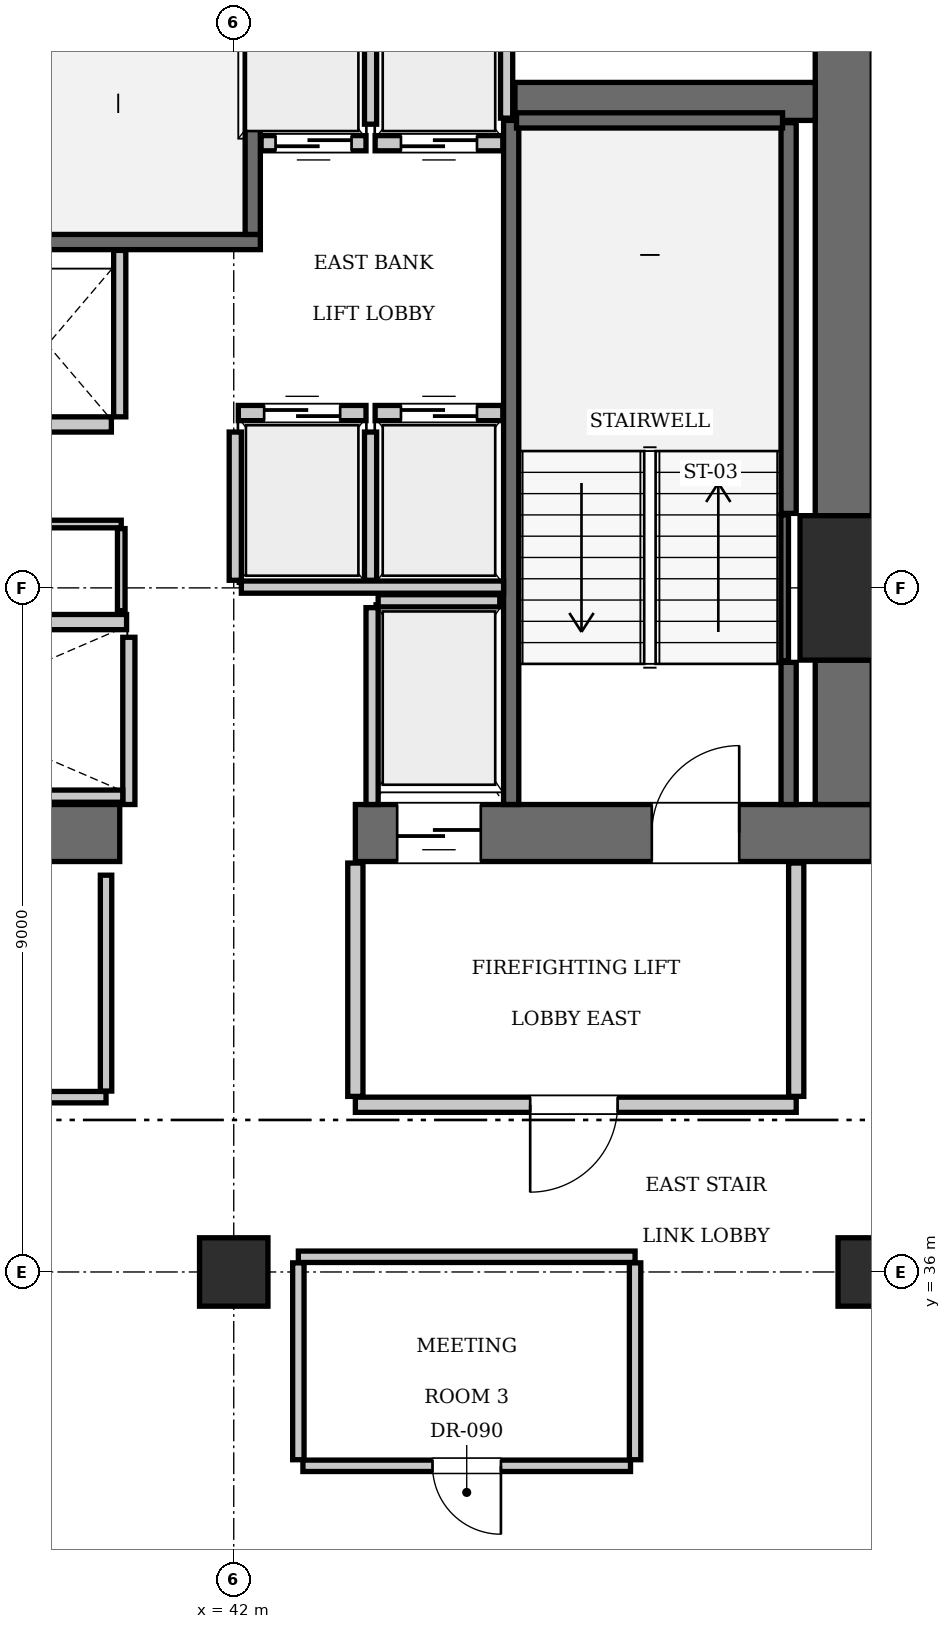
"""IFC4 building model, lengths in metres.
Left out: names, types, materials, properties, quantities, classifications, styles, units other than length and angle.
Written with IfcOpenShell. Run it as: python <this file> out.ifc"""

import sys

from ifc_helpers import new_model, si_unit, direction, frame, frame_2d, origin, origin_2d, place, context, subcontext, project, spatial, rectangle, extrude, element, fill, save


model = new_model("IFC4")
c1 = context("Model", 3, precision=1e-05, world=origin(), true_north=direction((0.0, 1.0)))
c2 = subcontext(c1, "Body", "Model", "MODEL_VIEW")
j1 = project(units=[si_unit("LENGTHUNIT", "METRE"), si_unit("PLANEANGLEUNIT", "RADIAN")], contexts=[c1])
p1 = place(None, origin())
s1 = spatial("IfcSite", under=j1, at=p1, CompositionType="ELEMENT")
p2 = place(p1, origin())
s2 = spatial("IfcBuilding", under=s1, at=p2, CompositionType="ELEMENT")
p3 = place(p2, frame((0.0, 0.0, 173.6)))
s3 = spatial("IfcBuildingStorey", under=s2, at=p3, CompositionType="ELEMENT", Elevation=173.6)
p4 = place(p3, frame((50.4, 45.0, 0.0), z_axis=(0.0, 0.0, 1.0), x_axis=(1.0, 0.0, 0.0)))
e1 = element("IfcColumn", 1, at=p4, inside=s3, PredefinedType="COLUMN", context=c2, shape_type="SweptSolid", body=[
    extrude(rectangle(XDim=1.9, YDim=1.9, at=origin_2d()), origin(), (0.0, 0.0, 1.0), 3.85),
])
p5 = place(p3, frame((35.1, 41.775, 0.0), z_axis=(0.0, 0.0, 1.0), x_axis=(1.0, 0.0, 0.0)))
e2 = element("IfcWall", 2, at=p5, inside=s3, PredefinedType="SHEAR", context=c2, shape_type="SweptSolid", body=[
    extrude(rectangle(XDim=5.4, YDim=0.75, at=frame_2d((2.7, 0.0))), origin(), (0.0, 0.0, 1.0), 3.85),
])
p6 = place(p3, frame((43.6, 41.775, 0.0), z_axis=(0.0, 0.0, 1.0), x_axis=(1.0, 0.0, 0.0)))
e3 = element("IfcWall", 3, at=p6, inside=s3, PredefinedType="SHEAR", context=c2, shape_type="SweptSolid", body=[
    extrude(rectangle(XDim=6.8, YDim=0.75, at=frame_2d((3.4, 0.0))), origin(), (0.0, 0.0, 1.0), 3.85),
])
p7 = place(p6, frame((3.9, 0.0, 0.0)))
e4 = element("IfcOpeningElement", 4, at=p7, cuts=e3, PredefinedType="OPENING", context=c2, shape_type="SweptSolid", body=[
    extrude(rectangle(XDim=1.15, YDim=2.15, at=frame_2d((0.575, 1.075))), frame((0.0, 0.385, 0.0), z_axis=(0.0, -1.0, 0.0), x_axis=(1.0, 0.0, 0.0)), (0.0, 0.0, 1.0), 0.77),
])
p8 = place(p6, frame((0.55, 0.0, 0.0)))
e5 = element("IfcOpeningElement", 5, at=p8, cuts=e3, PredefinedType="OPENING", context=c2, shape_type="SweptSolid", body=[
    extrude(rectangle(XDim=1.1, YDim=2.2, at=frame_2d((0.55, 1.1))), frame((0.0, 0.385, 0.0), z_axis=(0.0, -1.0, 0.0), x_axis=(1.0, 0.0, 0.0)), (0.0, 0.0, 1.0), 0.77),
])
p9 = place(p3, frame((50.025, 42.15, 0.0), z_axis=(0.0, 0.0, 1.0), x_axis=(0.0, 1.0, 0.0)))
e6 = element("IfcWall", 6, at=p9, inside=s3, PredefinedType="SHEAR", context=c2, shape_type="SweptSolid", body=[
    extrude(rectangle(XDim=1.9, YDim=0.75, at=frame_2d((0.95, 0.0))), origin(), (0.0, 0.0, 1.0), 3.85),
])
p10 = place(p3, frame((50.025, 45.95, 0.0), z_axis=(0.0, 0.0, 1.0), x_axis=(0.0, 1.0, 0.0)))
e7 = element("IfcWall", 7, at=p10, inside=s3, PredefinedType="SHEAR", context=c2, shape_type="SweptSolid", body=[
    extrude(rectangle(XDim=7.3, YDim=0.75, at=frame_2d((3.65, 0.0))), origin(), (0.0, 0.0, 1.0), 3.85),
])
p11 = place(p3, frame((45.7, 51.4, 0.0), z_axis=(0.0, 0.0, 1.0), x_axis=(1.0, 0.0, 0.0)))
e8 = element("IfcWall", 8, at=p11, inside=s3, PredefinedType="SHEAR", context=c2, shape_type="SweptSolid", body=[
    extrude(rectangle(XDim=3.95, YDim=0.5, at=frame_2d((1.975, 0.0))), origin(), (0.0, 0.0, 1.0), 3.85),
])
for number, where, z_axis, x_axis in (
    (9, (42.0, 36.0, 0.0), (0.0, 0.0, 1.0), (1.0, 0.0, 0.0)),
    (10, (50.4, 36.0, 0.0), (0.0, 0.0, 1.0), (1.0, 0.0, 0.0)),
):
    element("IfcColumn", number, at=place(p3, frame(where, z_axis=z_axis, x_axis=x_axis)), inside=s3, PredefinedType="COLUMN", context=c2, shape_type="SweptSolid", body=[
        extrude(rectangle(XDim=0.9, YDim=0.9, at=origin_2d()), origin(), (0.0, 0.0, 1.0), 3.85),
    ])
p12 = place(p3, frame((33.25, 49.55, 0.0), z_axis=(0.0, 0.0, 1.0), x_axis=(1.0, 0.0, 0.0)))
e11 = element("IfcWall", 11, at=p12, inside=s3, PredefinedType="SOLIDWALL", context=c2, shape_type="SweptSolid", body=[
    extrude(rectangle(XDim=9.1, YDim=0.2, at=frame_2d((4.55, 0.0))), origin(), (0.0, 0.0, 1.0), 3.61),
])
p13 = place(p3, frame((42.25, 49.65, 0.0), z_axis=(0.0, 0.0, 1.0), x_axis=(0.0, 1.0, 0.0)))
e12 = element("IfcWall", 12, at=p13, inside=s3, PredefinedType="SOLIDWALL", context=c2, shape_type="SweptSolid", body=[
    extrude(rectangle(XDim=3.6, YDim=0.2, at=frame_2d((1.8, 0.0))), origin(), (0.0, 0.0, 1.0), 3.61),
])
p14 = place(p3, frame((45.65, 42.15, 0.0), z_axis=(0.0, 0.0, 1.0), x_axis=(0.0, 1.0, 0.0)))
e13 = element("IfcWall", 13, at=p14, inside=s3, PredefinedType="SOLIDWALL", context=c2, shape_type="SweptSolid", body=[
    extrude(rectangle(XDim=9.0, YDim=0.2, at=frame_2d((4.5, 0.0))), origin(), (0.0, 0.0, 1.0), 3.61),
])
p15 = place(p3, frame((49.3, 42.15, 0.0), z_axis=(0.0, 0.0, 1.0), x_axis=(0.0, 1.0, 0.0)))
e14 = element("IfcWall", 14, at=p15, inside=s3, PredefinedType="SOLIDWALL", context=c2, shape_type="SweptSolid", body=[
    extrude(rectangle(XDim=1.87, YDim=0.2, at=frame_2d((0.935, 0.0))), origin(), (0.0, 0.0, 1.0), 3.61),
])
p16 = place(p3, frame((49.3, 45.98, 0.0), z_axis=(0.0, 0.0, 1.0), x_axis=(0.0, 1.0, 0.0)))
e15 = element("IfcWall", 15, at=p16, inside=s3, PredefinedType="SOLIDWALL", context=c2, shape_type="SweptSolid", body=[
    extrude(rectangle(XDim=5.14, YDim=0.2, at=frame_2d((2.57, 0.0))), origin(), (0.0, 0.0, 1.0), 3.61),
])
p17 = place(p3, frame((45.72, 51.15, 0.0), z_axis=(0.0, 0.0, 1.0), x_axis=(1.0, 0.0, 0.0)))
e16 = element("IfcWall", 16, at=p17, inside=s3, PredefinedType="SOLIDWALL", context=c2, shape_type="SweptSolid", body=[
    extrude(rectangle(XDim=3.5, YDim=0.2, at=frame_2d((1.75, 0.0))), origin(), (0.0, 0.0, 1.0), 3.61),
])
p18 = place(p3, frame((49.248, 44.04, 0.0), z_axis=(0.0, 0.0, 1.0), x_axis=(0.0, 1.0, 0.0)))
e17 = element("IfcWall", 17, at=p18, inside=s3, PredefinedType="SOLIDWALL", context=c2, shape_type="SweptSolid", body=[
    extrude(rectangle(XDim=1.92, YDim=0.1, at=frame_2d((0.96, 0.0))), origin(), (0.0, 0.0, 1.0), 3.61),
])
p19 = place(p3, frame((42.06, 47.3, 0.0), z_axis=(0.0, 0.0, 1.0), x_axis=(1.0, 0.0, 0.0)))
e18 = element("IfcWall", 18, at=p19, inside=s3, PredefinedType="SOLIDWALL", context=c2, shape_type="SweptSolid", body=[
    extrude(rectangle(XDim=1.68, YDim=0.2, at=frame_2d((0.84, 0.0))), origin(), (0.0, 0.0, 1.0), 3.61),
])
p20 = place(p19, frame((0.34, 0.0, 0.0)))
e19 = element("IfcOpeningElement", 19, at=p20, cuts=e18, PredefinedType="OPENING", context=c2, shape_type="SweptSolid", body=[
    extrude(rectangle(XDim=1.0, YDim=2.15, at=frame_2d((0.5, 1.075))), frame((0.0, 0.11, 0.0), z_axis=(0.0, -1.0, 0.0), x_axis=(1.0, 0.0, 0.0)), (0.0, 0.0, 1.0), 0.22),
])
p21 = place(p3, frame((43.86, 47.3, 0.0), z_axis=(0.0, 0.0, 1.0), x_axis=(1.0, 0.0, 0.0)))
e20 = element("IfcWall", 20, at=p21, inside=s3, PredefinedType="SOLIDWALL", context=c2, shape_type="SweptSolid", body=[
    extrude(rectangle(XDim=1.68, YDim=0.2, at=frame_2d((0.84, 0.0))), origin(), (0.0, 0.0, 1.0), 3.61),
])
p22 = place(p21, frame((0.34, 0.0, 0.0)))
e21 = element("IfcOpeningElement", 21, at=p22, cuts=e20, PredefinedType="OPENING", context=c2, shape_type="SweptSolid", body=[
    extrude(rectangle(XDim=1.0, YDim=2.15, at=frame_2d((0.5, 1.075))), frame((0.0, 0.11, 0.0), z_axis=(0.0, -1.0, 0.0), x_axis=(1.0, 0.0, 0.0)), (0.0, 0.0, 1.0), 0.22),
])
p23 = place(p3, frame((42.36, 50.85, 0.0), z_axis=(0.0, 0.0, 1.0), x_axis=(1.0, 0.0, 0.0)))
e22 = element("IfcWall", 22, at=p23, inside=s3, PredefinedType="SOLIDWALL", context=c2, shape_type="SweptSolid", body=[
    extrude(rectangle(XDim=1.38, YDim=0.2, at=frame_2d((0.69, 0.0))), origin(), (0.0, 0.0, 1.0), 3.61),
])
p24 = place(p23, frame((0.19, 0.0, 0.0)))
e23 = element("IfcOpeningElement", 23, at=p24, cuts=e22, PredefinedType="OPENING", context=c2, shape_type="SweptSolid", body=[
    extrude(rectangle(XDim=1.0, YDim=2.15, at=frame_2d((0.5, 1.075))), frame((0.0, 0.11, 0.0), z_axis=(0.0, -1.0, 0.0), x_axis=(1.0, 0.0, 0.0)), (0.0, 0.0, 1.0), 0.22),
])
p25 = place(p3, frame((43.86, 50.85, 0.0), z_axis=(0.0, 0.0, 1.0), x_axis=(1.0, 0.0, 0.0)))
e24 = element("IfcWall", 24, at=p25, inside=s3, PredefinedType="SOLIDWALL", context=c2, shape_type="SweptSolid", body=[
    extrude(rectangle(XDim=1.68, YDim=0.2, at=frame_2d((0.84, 0.0))), origin(), (0.0, 0.0, 1.0), 3.61),
])
p26 = place(p25, frame((0.34, 0.0, 0.0)))
e25 = element("IfcOpeningElement", 25, at=p26, cuts=e24, PredefinedType="OPENING", context=c2, shape_type="SweptSolid", body=[
    extrude(rectangle(XDim=1.0, YDim=2.15, at=frame_2d((0.5, 1.075))), frame((0.0, 0.11, 0.0), z_axis=(0.0, -1.0, 0.0), x_axis=(1.0, 0.0, 0.0)), (0.0, 0.0, 1.0), 0.22),
])
p27 = place(p3, frame((38.91, 44.55, 0.0), z_axis=(0.0, 0.0, 1.0), x_axis=(1.0, 0.0, 0.0)))
e26 = element("IfcWall", 26, at=p27, inside=s3, PredefinedType="SOLIDWALL", context=c2, shape_type="SweptSolid", body=[
    extrude(rectangle(XDim=1.68, YDim=0.2, at=frame_2d((0.84, 0.0))), origin(), (0.0, 0.0, 1.0), 3.61),
])
p28 = place(p3, frame((38.71, 47.15, 0.0), z_axis=(0.0, 0.0, 1.0), x_axis=(1.0, 0.0, 0.0)))
e27 = element("IfcWall", 27, at=p28, inside=s3, PredefinedType="SOLIDWALL", context=c2, shape_type="SweptSolid", body=[
    extrude(rectangle(XDim=1.68, YDim=0.2, at=frame_2d((0.84, 0.0))), origin(), (0.0, 0.0, 1.0), 3.61),
])
p29 = place(p3, frame((43.9, 44.83, 0.0), z_axis=(0.0, 0.0, 1.0), x_axis=(1.0, 0.0, 0.0)))
e28 = element("IfcWall", 28, at=p29, inside=s3, PredefinedType="SOLIDWALL", context=c2, shape_type="SweptSolid", body=[
    extrude(rectangle(XDim=1.6, YDim=0.16, at=frame_2d((0.8, 0.0))), origin(), (0.0, 0.0, 1.0), 3.61),
])
p30 = place(p3, frame((43.82, 42.15, 0.0), z_axis=(0.0, 0.0, 1.0), x_axis=(0.0, 1.0, 0.0)))
e29 = element("IfcWall", 29, at=p30, inside=s3, PredefinedType="SOLIDWALL", context=c2, shape_type="SweptSolid", body=[
    extrude(rectangle(XDim=2.59, YDim=0.16, at=frame_2d((1.295, 0.0))), origin(), (0.0, 0.0, 1.0), 3.61),
])
for number, where, z_axis, x_axis in (
    (30, (42.02, 45.1, 0.0), (0.0, 0.0, 1.0), (0.0, 1.0, 0.0)),
    (31, (43.8, 45.1, 0.0), (0.0, 0.0, 1.0), (0.0, 1.0, 0.0)),
):
    element("IfcWall", number, at=place(p3, frame(where, z_axis=z_axis, x_axis=x_axis)), inside=s3, PredefinedType="SOLIDWALL", context=c2, shape_type="SweptSolid", body=[
        extrude(rectangle(XDim=1.95, YDim=0.16, at=frame_2d((0.975, 0.0))), origin(), (0.0, 0.0, 1.0), 3.61),
    ])
p31 = place(p3, frame((42.1, 45.01, 0.0), z_axis=(0.0, 0.0, 1.0), x_axis=(1.0, 0.0, 0.0)))
e32 = element("IfcWall", 32, at=p31, inside=s3, PredefinedType="SOLIDWALL", context=c2, shape_type="SweptSolid", body=[
    extrude(rectangle(XDim=3.45, YDim=0.16, at=frame_2d((1.725, 0.0))), origin(), (0.0, 0.0, 1.0), 3.61),
])
p32 = place(p3, frame((45.59, 51.18, 0.0), z_axis=(0.0, 0.0, 1.0), x_axis=(0.0, 1.0, 0.0)))
e33 = element("IfcWall", 33, at=p32, inside=s3, PredefinedType="SOLIDWALL", context=c2, shape_type="SweptSolid", body=[
    extrude(rectangle(XDim=2.07, YDim=0.16, at=frame_2d((1.035, 0.0))), origin(), (0.0, 0.0, 1.0), 3.61),
])
p33 = place(p3, frame((43.8, 51.1, 0.0), z_axis=(0.0, 0.0, 1.0), x_axis=(0.0, 1.0, 0.0)))
e34 = element("IfcWall", 34, at=p33, inside=s3, PredefinedType="SOLIDWALL", context=c2, shape_type="SweptSolid", body=[
    extrude(rectangle(XDim=2.15, YDim=0.16, at=frame_2d((1.075, 0.0))), origin(), (0.0, 0.0, 1.0), 3.61),
])
p34 = place(p3, frame((40.62, 42.15, 0.0), z_axis=(0.0, 0.0, 1.0), x_axis=(0.0, 1.0, 0.0)))
e35 = element("IfcWall", 35, at=p34, inside=s3, PredefinedType="SOLIDWALL", context=c2, shape_type="SweptSolid", body=[
    extrude(rectangle(XDim=2.2, YDim=0.16, at=frame_2d((1.1, 0.0))), origin(), (0.0, 0.0, 1.0), 3.61),
])
p35 = place(p3, frame((35.52, 42.26, 0.0), z_axis=(0.0, 0.0, 1.0), x_axis=(1.0, 0.0, 0.0)))
e36 = element("IfcWall", 36, at=p35, inside=s3, PredefinedType="SOLIDWALL", context=c2, shape_type="SweptSolid", body=[
    extrude(rectangle(XDim=5.02, YDim=0.16, at=frame_2d((2.51, 0.0))), origin(), (0.0, 0.0, 1.0), 3.61),
])
p36 = place(p3, frame((40.5, 47.25, 0.0), z_axis=(0.0, 0.0, 1.0), x_axis=(0.0, 1.0, 0.0)))
e37 = element("IfcWall", 37, at=p36, inside=s3, PredefinedType="SOLIDWALL", context=c2, shape_type="SweptSolid", body=[
    extrude(rectangle(XDim=2.19, YDim=0.16, at=frame_2d((1.095, 0.0))), origin(), (0.0, 0.0, 1.0), 3.61),
])
p37 = place(p3, frame((43.6, 38.2, 0.0), z_axis=(0.0, 0.0, 1.0), x_axis=(1.0, 0.0, 0.0)))
e38 = element("IfcWall", 38, at=p37, inside=s3, PredefinedType="PARTITIONING", context=c2, shape_type="SweptSolid", body=[
    extrude(rectangle(XDim=5.8, YDim=0.2, at=frame_2d((2.9, 0.0))), origin(), (0.0, 0.0, 1.0), 3.61),
])
p38 = place(p37, frame((2.3, 0.0, 0.0)))
e39 = element("IfcOpeningElement", 39, at=p38, cuts=e38, PredefinedType="OPENING", context=c2, shape_type="SweptSolid", body=[
    extrude(rectangle(XDim=1.15, YDim=2.15, at=frame_2d((0.575, 1.075))), frame((0.0, 0.11, 0.0), z_axis=(0.0, -1.0, 0.0), x_axis=(1.0, 0.0, 0.0)), (0.0, 0.0, 1.0), 0.22),
])
for number, where, z_axis, x_axis in (
    (40, (43.6, 38.31, 0.0), (0.0, 0.0, 1.0), (0.0, 1.0, 0.0)),
    (41, (49.4, 38.31, 0.0), (0.0, 0.0, 1.0), (0.0, 1.0, 0.0)),
):
    element("IfcWall", number, at=place(p3, frame(where, z_axis=z_axis, x_axis=x_axis)), inside=s3, PredefinedType="PARTITIONING", context=c2, shape_type="SweptSolid", body=[
        extrude(rectangle(XDim=3.07, YDim=0.2, at=frame_2d((1.535, 0.0))), origin(), (0.0, 0.0, 1.0), 3.61),
    ])
p39 = place(p3, frame((35.58, 45.84, 0.0), z_axis=(0.0, 0.0, 1.0), x_axis=(1.0, 0.0, 0.0)))
e42 = element("IfcWall", 42, at=p39, inside=s3, PredefinedType="PARTITIONING", context=c2, shape_type="SweptSolid", body=[
    extrude(rectangle(XDim=4.94, YDim=0.1, at=frame_2d((2.47, 0.0))), origin(), (0.0, 0.0, 1.0), 3.61),
])
p40 = place(p39, frame((1.8, 0.0, 0.0)))
e43 = element("IfcOpeningElement", 43, at=p40, cuts=e42, PredefinedType="OPENING", context=c2, shape_type="SweptSolid", body=[
    extrude(rectangle(XDim=0.8, YDim=2.05, at=frame_2d((0.4, 1.025))), frame((0.0, 0.06, 0.0), z_axis=(0.0, -1.0, 0.0), x_axis=(1.0, 0.0, 0.0)), (0.0, 0.0, 1.0), 0.12),
])
p41 = place(p3, frame((40.52, 44.7, 0.0), z_axis=(0.0, 0.0, 1.0), x_axis=(0.0, 1.0, 0.0)))
e44 = element("IfcWall", 44, at=p41, inside=s3, PredefinedType="PARTITIONING", context=c2, shape_type="SweptSolid", body=[
    extrude(rectangle(XDim=1.08, YDim=0.1, at=frame_2d((0.54, 0.0))), origin(), (0.0, 0.0, 1.0), 3.61),
])
p42 = place(p3, frame((34.4, 38.3, 0.0), z_axis=(0.0, 0.0, 1.0), x_axis=(1.0, 0.0, 0.0)))
e45 = element("IfcWall", 45, at=p42, inside=s3, PredefinedType="PARTITIONING", context=c2, shape_type="SweptSolid", body=[
    extrude(rectangle(XDim=5.92, YDim=0.15, at=frame_2d((2.96, 0.0))), origin(), (0.0, 0.0, 1.0), 3.61),
])
p43 = place(p42, frame((2.4, 0.0, 0.0)))
e46 = element("IfcOpeningElement", 46, at=p43, cuts=e45, PredefinedType="OPENING", context=c2, shape_type="SweptSolid", body=[
    extrude(rectangle(XDim=0.9, YDim=2.1, at=frame_2d((0.45, 1.05))), frame((0.0, 0.085, 0.0), z_axis=(0.0, -1.0, 0.0), x_axis=(1.0, 0.0, 0.0)), (0.0, 0.0, 1.0), 0.17),
])
p44 = place(p3, frame((40.32, 38.38, 0.0), z_axis=(0.0, 0.0, 1.0), x_axis=(0.0, 1.0, 0.0)))
e47 = element("IfcWall", 47, at=p44, inside=s3, PredefinedType="PARTITIONING", context=c2, shape_type="SweptSolid", body=[
    extrude(rectangle(XDim=2.84, YDim=0.15, at=frame_2d((1.42, 0.0))), origin(), (0.0, 0.0, 1.0), 3.61),
])
p45 = place(p3, frame((42.85, 36.2, 0.0), z_axis=(0.0, 0.0, 1.0), x_axis=(1.0, 0.0, 0.0)))
e48 = element("IfcWall", 48, at=p45, inside=s3, PredefinedType="PARTITIONING", context=c2, shape_type="SweptSolid", body=[
    extrude(rectangle(XDim=4.43, YDim=0.15, at=frame_2d((2.215, 0.0))), origin(), (0.0, 0.0, 1.0), 3.61),
])
for number, where, z_axis, x_axis in (
    (49, (42.85, 33.53, 0.0), (0.0, 0.0, 1.0), (0.0, 1.0, 0.0)),
    (50, (47.28, 33.53, 0.0), (0.0, 0.0, 1.0), (0.0, 1.0, 0.0)),
):
    element("IfcWall", number, at=place(p3, frame(where, z_axis=z_axis, x_axis=x_axis)), inside=s3, PredefinedType="PARTITIONING", context=c2, shape_type="SweptSolid", body=[
        extrude(rectangle(XDim=2.59, YDim=0.15, at=frame_2d((1.295, 0.0))), origin(), (0.0, 0.0, 1.0), 3.61),
    ])
p46 = place(p3, frame((42.91, 33.45, 0.0), z_axis=(0.0, 0.0, 1.0), x_axis=(1.0, 0.0, 0.0)))
e51 = element("IfcWall", 51, at=p46, inside=s3, PredefinedType="PARTITIONING", context=c2, shape_type="SweptSolid", body=[
    extrude(rectangle(XDim=4.31, YDim=0.15, at=frame_2d((2.155, 0.0))), origin(), (0.0, 0.0, 1.0), 3.61),
])
p47 = place(p46, frame((1.705, 0.0, 0.0)))
e52 = element("IfcOpeningElement", 52, at=p47, cuts=e51, PredefinedType="OPENING", context=c2, shape_type="SweptSolid", body=[
    extrude(rectangle(XDim=0.9, YDim=2.1, at=frame_2d((0.45, 1.05))), frame((0.0, 0.085, 0.0), z_axis=(0.0, -1.0, 0.0), x_axis=(1.0, 0.0, 0.0)), (0.0, 0.0, 1.0), 0.17),
])
p48 = place(p7, origin())
e53 = element("IfcDoor", 53, at=p48, inside=s3, OperationType="SINGLE_SWING_RIGHT", PredefinedType="DOOR", context=c2, shape_type="SweptSolid", body=[
    extrude(rectangle(XDim=1.15, YDim=2.15, at=frame_2d((0.575, 1.075))), frame((0.0, 0.025, 0.0), z_axis=(0.0, -1.0, 0.0), x_axis=(1.0, 0.0, 0.0)), (0.0, 0.0, 1.0), 0.05),
])
fill(e4, e53)
p49 = place(p20, origin())
e54 = element("IfcDoor", 54, at=p49, inside=s3, OperationType="SLIDING_TO_LEFT", PredefinedType="DOOR", context=c2, shape_type="SweptSolid", body=[
    extrude(rectangle(XDim=1.0, YDim=2.15, at=frame_2d((0.5, 1.075))), frame((0.0, 0.025, 0.0), z_axis=(0.0, -1.0, 0.0), x_axis=(1.0, 0.0, 0.0)), (0.0, 0.0, 1.0), 0.05),
])
fill(e19, e54)
p50 = place(p22, origin())
e55 = element("IfcDoor", 55, at=p50, inside=s3, OperationType="SLIDING_TO_LEFT", PredefinedType="DOOR", context=c2, shape_type="SweptSolid", body=[
    extrude(rectangle(XDim=1.0, YDim=2.15, at=frame_2d((0.5, 1.075))), frame((0.0, 0.025, 0.0), z_axis=(0.0, -1.0, 0.0), x_axis=(1.0, 0.0, 0.0)), (0.0, 0.0, 1.0), 0.05),
])
fill(e21, e55)
p51 = place(p24, frame((1.0, 0.0, 0.0), z_axis=(0.0, 0.0, 1.0), x_axis=(-1.0, 0.0, 0.0)))
e56 = element("IfcDoor", 56, at=p51, inside=s3, OperationType="SLIDING_TO_LEFT", PredefinedType="DOOR", context=c2, shape_type="SweptSolid", body=[
    extrude(rectangle(XDim=1.0, YDim=2.15, at=frame_2d((0.5, 1.075))), frame((0.0, 0.025, 0.0), z_axis=(0.0, -1.0, 0.0), x_axis=(1.0, 0.0, 0.0)), (0.0, 0.0, 1.0), 0.05),
])
fill(e23, e56)
p52 = place(p26, frame((1.0, 0.0, 0.0), z_axis=(0.0, 0.0, 1.0), x_axis=(-1.0, 0.0, 0.0)))
e57 = element("IfcDoor", 57, at=p52, inside=s3, OperationType="SLIDING_TO_LEFT", PredefinedType="DOOR", context=c2, shape_type="SweptSolid", body=[
    extrude(rectangle(XDim=1.0, YDim=2.15, at=frame_2d((0.5, 1.075))), frame((0.0, 0.025, 0.0), z_axis=(0.0, -1.0, 0.0), x_axis=(1.0, 0.0, 0.0)), (0.0, 0.0, 1.0), 0.05),
])
fill(e25, e57)
p53 = place(p8, frame((1.1, 0.0, 0.0), z_axis=(0.0, 0.0, 1.0), x_axis=(-1.0, 0.0, 0.0)))
e58 = element("IfcDoor", 58, at=p53, inside=s3, OperationType="SLIDING_TO_LEFT", PredefinedType="DOOR", context=c2, shape_type="SweptSolid", body=[
    extrude(rectangle(XDim=1.1, YDim=2.2, at=frame_2d((0.55, 1.1))), frame((0.0, 0.025, 0.0), z_axis=(0.0, -1.0, 0.0), x_axis=(1.0, 0.0, 0.0)), (0.0, 0.0, 1.0), 0.05),
])
fill(e5, e58)
p54 = place(p38, frame((1.15, 0.0, 0.0), z_axis=(0.0, 0.0, 1.0), x_axis=(-1.0, 0.0, 0.0)))
e59 = element("IfcDoor", 59, at=p54, inside=s3, OperationType="SINGLE_SWING_RIGHT", PredefinedType="DOOR", context=c2, shape_type="SweptSolid", body=[
    extrude(rectangle(XDim=1.15, YDim=2.15, at=frame_2d((0.575, 1.075))), frame((0.0, 0.025, 0.0), z_axis=(0.0, -1.0, 0.0), x_axis=(1.0, 0.0, 0.0)), (0.0, 0.0, 1.0), 0.05),
])
fill(e39, e59)
p55 = place(p47, frame((0.9, 0.0, 0.0), z_axis=(0.0, 0.0, 1.0), x_axis=(-1.0, 0.0, 0.0)))
e60 = element("IfcDoor", 60, at=p55, inside=s3, OperationType="SINGLE_SWING_LEFT", PredefinedType="DOOR", context=c2, shape_type="SweptSolid", body=[
    extrude(rectangle(XDim=0.9, YDim=2.1, at=frame_2d((0.45, 1.05))), frame((0.0, 0.025, 0.0), z_axis=(0.0, -1.0, 0.0), x_axis=(1.0, 0.0, 0.0)), (0.0, 0.0, 1.0), 0.05),
])
fill(e52, e60)
save(model, sys.argv[1])
